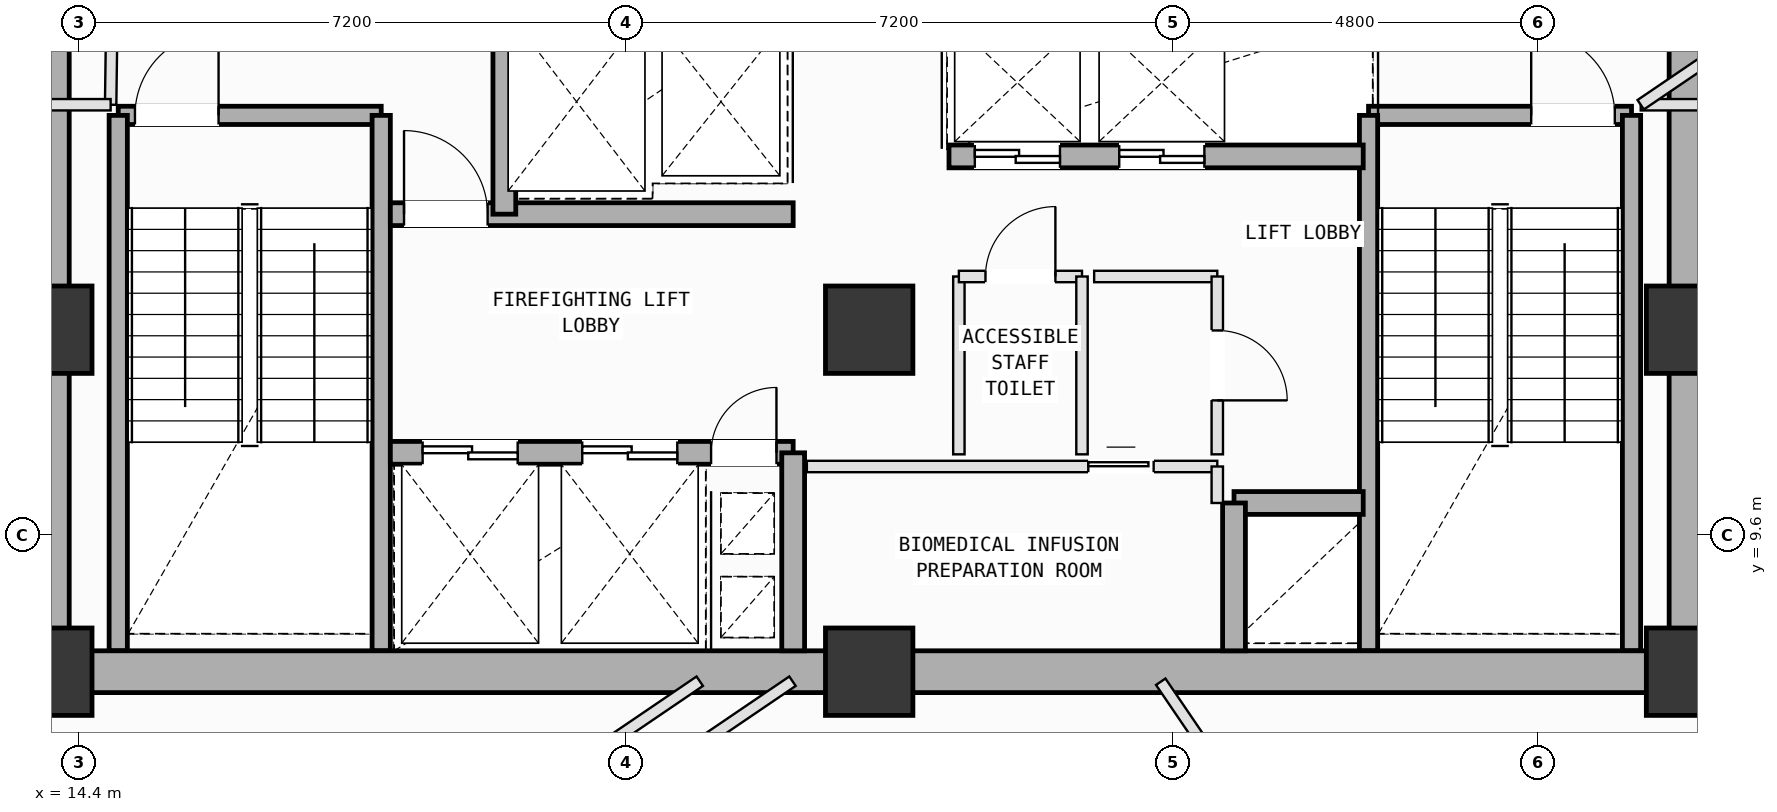
"""IFC4 building model, lengths in metres.
Left out: names, types, materials, properties, quantities, classifications, styles, units other than length and angle.
Written with IfcOpenShell. Run it as: python <this file> out.ifc"""

import sys

from ifc_helpers import new_model, si_unit, direction, frame, frame_2d, origin, origin_2d, place, context, subcontext, project, spatial, rectangle, extrude, element, fill, save


model = new_model("IFC4")
c1 = context("Model", 3, precision=1e-05, world=origin(), true_north=direction((0.0, 1.0)))
c2 = subcontext(c1, "Body", "Model", "MODEL_VIEW")
j1 = project(units=[si_unit("LENGTHUNIT", "METRE"), si_unit("PLANEANGLEUNIT", "RADIAN")], contexts=[c1])
p1 = place(None, origin())
s1 = spatial("IfcSite", under=j1, at=p1, CompositionType="ELEMENT")
p2 = place(p1, origin())
s2 = spatial("IfcBuilding", under=s1, at=p2, CompositionType="ELEMENT")
p3 = place(p2, frame((0.0, 0.0, 169.8)))
s3 = spatial("IfcBuildingStorey", under=s2, at=p3, CompositionType="ELEMENT", Elevation=169.8)
for number, where, z_axis, x_axis in (
    (1, (14.0, 7.8, 0.0), (0.0, 0.0, 1.0), (1.0, 0.0, 0.0)),
    (2, (14.0, 12.3, 0.0), (0.0, 0.0, 1.0), (1.0, 0.0, 0.0)),
    (3, (24.8, 7.8, 0.0), (0.0, 0.0, 1.0), (1.0, 0.0, 0.0)),
    (4, (24.8, 12.3, 0.0), (0.0, 0.0, 1.0), (1.0, 0.0, 0.0)),
    (5, (35.6, 7.8, 0.0), (0.0, 0.0, 1.0), (1.0, 0.0, 0.0)),
    (6, (35.6, 12.3, 0.0), (0.0, 0.0, 1.0), (1.0, 0.0, 0.0)),
):
    element("IfcColumn", number, at=place(p3, frame(where, z_axis=z_axis, x_axis=x_axis)), inside=s3, PredefinedType="COLUMN", context=c2, shape_type="SweptSolid", body=[
        extrude(rectangle(XDim=1.15, YDim=1.15, at=origin_2d()), origin(), (0.0, 0.0, 1.0), 4.0),
    ])
p4 = place(p3, frame((14.344, 4.298, 0.0), z_axis=(0.0, 0.0, 1.0), x_axis=(-0.562080452942, 0.827082562034, 0.0)))
e7 = element("IfcWall", 7, at=p4, inside=s3, PredefinedType="SOLIDWALL", context=c2, shape_type="SweptSolid", body=[
    extrude(rectangle(XDim=7.36, YDim=0.28, at=frame_2d((3.68, 0.0))), origin(), (0.0, 0.0, 1.0), 3.165),
])
p5 = place(p4, frame((2.981, 0.0, 0.75)))
e8 = element("IfcOpeningElement", 8, at=p5, cuts=e7, PredefinedType="OPENING", context=c2, shape_type="SweptSolid", body=[
    extrude(rectangle(XDim=1.4, YDim=1.85, at=frame_2d((0.7, 0.925))), frame((0.0, 0.15, 0.0), z_axis=(0.0, -1.0, 0.0), x_axis=(1.0, 0.0, 0.0)), (0.0, 0.0, 1.0), 0.3),
])
p6 = place(p4, frame((5.236, 0.0, 0.75)))
e9 = element("IfcOpeningElement", 9, at=p6, cuts=e7, PredefinedType="OPENING", context=c2, shape_type="SweptSolid", body=[
    extrude(rectangle(XDim=1.4, YDim=1.85, at=frame_2d((0.7, 0.925))), frame((0.0, 0.15, 0.0), z_axis=(0.0, -1.0, 0.0), x_axis=(1.0, 0.0, 0.0)), (0.0, 0.0, 1.0), 0.3),
])
p7 = place(p3, frame((14.92, 15.12, 0.0), z_axis=(0.0, 0.0, 1.0), x_axis=(1.0, 0.0, 0.0)))
e10 = element("IfcWall", 10, at=p7, inside=s3, PredefinedType="SOLIDWALL", context=c2, shape_type="SweptSolid", body=[
    extrude(rectangle(XDim=3.46, YDim=0.24, at=frame_2d((1.73, 0.0))), origin(), (0.0, 0.0, 1.0), 3.78),
])
p8 = place(p7, frame((0.22, 0.0, 0.0)))
e11 = element("IfcOpeningElement", 11, at=p8, cuts=e10, PredefinedType="OPENING", context=c2, shape_type="SweptSolid", body=[
    extrude(rectangle(XDim=1.1, YDim=2.15, at=frame_2d((0.55, 1.075))), frame((0.0, 0.13, 0.0), z_axis=(0.0, -1.0, 0.0), x_axis=(1.0, 0.0, 0.0)), (0.0, 0.0, 1.0), 0.26),
])
for number, where, z_axis, x_axis in (
    (12, (18.38, 15.12, 0.0), (0.0, 0.0, 1.0), (0.0, -1.0, 0.0)),
    (13, (14.92, 8.075, 0.0), (0.0, 0.0, 1.0), (0.0, 1.0, 0.0)),
):
    element("IfcWall", number, at=place(p3, frame(where, z_axis=z_axis, x_axis=x_axis)), inside=s3, PredefinedType="SOLIDWALL", context=c2, shape_type="SweptSolid", body=[
        extrude(rectangle(XDim=7.045, YDim=0.24, at=frame_2d((3.522, 0.0))), origin(), (0.0, 0.0, 1.0), 3.78),
    ])
p9 = place(p3, frame((31.37, 15.12, 0.0), z_axis=(0.0, 0.0, 1.0), x_axis=(1.0, 0.0, 0.0)))
e14 = element("IfcWall", 14, at=p9, inside=s3, PredefinedType="SOLIDWALL", context=c2, shape_type="SweptSolid", body=[
    extrude(rectangle(XDim=3.46, YDim=0.24, at=frame_2d((1.73, 0.0))), origin(), (0.0, 0.0, 1.0), 3.78),
])
p10 = place(p9, frame((2.14, 0.0, 0.0)))
e15 = element("IfcOpeningElement", 15, at=p10, cuts=e14, PredefinedType="OPENING", context=c2, shape_type="SweptSolid", body=[
    extrude(rectangle(XDim=1.1, YDim=2.15, at=frame_2d((0.55, 1.075))), frame((0.0, 0.13, 0.0), z_axis=(0.0, -1.0, 0.0), x_axis=(1.0, 0.0, 0.0)), (0.0, 0.0, 1.0), 0.26),
])
for number, where, z_axis, x_axis in (
    (16, (34.83, 15.12, 0.0), (0.0, 0.0, 1.0), (0.0, -1.0, 0.0)),
    (17, (31.37, 8.075, 0.0), (0.0, 0.0, 1.0), (0.0, 1.0, 0.0)),
):
    element("IfcWall", number, at=place(p3, frame(where, z_axis=z_axis, x_axis=x_axis)), inside=s3, PredefinedType="SOLIDWALL", context=c2, shape_type="SweptSolid", body=[
        extrude(rectangle(XDim=7.045, YDim=0.24, at=frame_2d((3.522, 0.0))), origin(), (0.0, 0.0, 1.0), 3.78),
    ])
for number, where, z_axis, x_axis in (
    (18, (14.0, 7.8, 0.0), (0.0, 0.0, 1.0), (1.0, 0.0, 0.0)),
    (19, (24.8, 7.8, 0.0), (0.0, 0.0, 1.0), (1.0, 0.0, 0.0)),
):
    element("IfcWall", number, at=place(p3, frame(where, z_axis=z_axis, x_axis=x_axis)), inside=s3, PredefinedType="SHEAR", context=c2, shape_type="SweptSolid", body=[
        extrude(rectangle(XDim=10.8, YDim=0.55, at=frame_2d((5.4, 0.0))), origin(), (0.0, 0.0, 1.0), 3.78),
    ])
for number, where, z_axis, x_axis in (
    (20, (35.6, 7.8, 0.0), (0.0, 0.0, 1.0), (0.0, 1.0, 0.0)),
    (21, (14.0, 16.8, 0.0), (0.0, 0.0, 1.0), (0.0, -1.0, 0.0)),
):
    element("IfcWall", number, at=place(p3, frame(where, z_axis=z_axis, x_axis=x_axis)), inside=s3, PredefinedType="SHEAR", context=c2, shape_type="SweptSolid", body=[
        extrude(rectangle(XDim=9.0, YDim=0.55, at=frame_2d((4.5, 0.0))), origin(), (0.0, 0.0, 1.0), 3.78),
    ])
p11 = place(p3, frame((18.5, 10.68, 0.0), z_axis=(0.0, 0.0, 1.0), x_axis=(1.0, 0.0, 0.0)))
e22 = element("IfcWall", 22, at=p11, inside=s3, PredefinedType="SOLIDWALL", context=c2, shape_type="SweptSolid", body=[
    extrude(rectangle(XDim=5.3, YDim=0.3, at=frame_2d((2.65, 0.0))), origin(), (0.0, 0.0, 1.0), 3.78),
])
p12 = place(p11, frame((4.22, 0.0, 0.0)))
e23 = element("IfcOpeningElement", 23, at=p12, cuts=e22, PredefinedType="OPENING", context=c2, shape_type="SweptSolid", body=[
    extrude(rectangle(XDim=0.86, YDim=2.06, at=frame_2d((0.43, 1.03))), frame((0.0, 0.16, 0.0), z_axis=(0.0, -1.0, 0.0), x_axis=(1.0, 0.0, 0.0)), (0.0, 0.0, 1.0), 0.32),
])
p13 = place(p11, frame((0.425, 0.0, 0.0)))
e24 = element("IfcOpeningElement", 24, at=p13, cuts=e22, PredefinedType="OPENING", context=c2, shape_type="SweptSolid", body=[
    extrude(rectangle(XDim=1.25, YDim=2.18, at=frame_2d((0.625, 1.09))), frame((0.0, 0.16, 0.0), z_axis=(0.0, -1.0, 0.0), x_axis=(1.0, 0.0, 0.0)), (0.0, 0.0, 1.0), 0.32),
])
p14 = place(p11, frame((2.525, 0.0, 0.0)))
e25 = element("IfcOpeningElement", 25, at=p14, cuts=e22, PredefinedType="OPENING", context=c2, shape_type="SweptSolid", body=[
    extrude(rectangle(XDim=1.25, YDim=2.18, at=frame_2d((0.625, 1.09))), frame((0.0, 0.16, 0.0), z_axis=(0.0, -1.0, 0.0), x_axis=(1.0, 0.0, 0.0)), (0.0, 0.0, 1.0), 0.32),
])
p15 = place(p3, frame((18.5, 13.82, 0.0), z_axis=(0.0, 0.0, 1.0), x_axis=(1.0, 0.0, 0.0)))
e26 = element("IfcWall", 26, at=p15, inside=s3, PredefinedType="SOLIDWALL", context=c2, shape_type="SweptSolid", body=[
    extrude(rectangle(XDim=5.3, YDim=0.3, at=frame_2d((2.65, 0.0))), origin(), (0.0, 0.0, 1.0), 3.78),
])
p16 = place(p15, frame((0.18, 0.0, 0.0)))
e27 = element("IfcOpeningElement", 27, at=p16, cuts=e26, PredefinedType="OPENING", context=c2, shape_type="SweptSolid", body=[
    extrude(rectangle(XDim=1.1, YDim=2.15, at=frame_2d((0.55, 1.075))), frame((0.0, 0.16, 0.0), z_axis=(0.0, -1.0, 0.0), x_axis=(1.0, 0.0, 0.0)), (0.0, 0.0, 1.0), 0.32),
])
p17 = place(p3, frame((23.8, 8.075, 0.0), z_axis=(0.0, 0.0, 1.0), x_axis=(0.0, 1.0, 0.0)))
e28 = element("IfcWall", 28, at=p17, inside=s3, PredefinedType="SOLIDWALL", context=c2, shape_type="SweptSolid", body=[
    extrude(rectangle(XDim=2.605, YDim=0.3, at=frame_2d((1.302, 0.0))), origin(), (0.0, 0.0, 1.0), 3.78),
])
p18 = place(p3, frame((20.0, 13.82, 0.0), z_axis=(0.0, 0.0, 1.0), x_axis=(0.0, 1.0, 0.0)))
e29 = element("IfcWall", 29, at=p18, inside=s3, PredefinedType="SOLIDWALL", context=c2, shape_type="SweptSolid", body=[
    extrude(rectangle(XDim=2.73, YDim=0.3, at=frame_2d((1.365, 0.0))), origin(), (0.0, 0.0, 1.0), 3.78),
])
p19 = place(p3, frame((29.6, 10.02, 0.0), z_axis=(0.0, 0.0, 1.0), x_axis=(1.0, 0.0, 0.0)))
e30 = element("IfcWall", 30, at=p19, inside=s3, PredefinedType="SOLIDWALL", context=c2, shape_type="SweptSolid", body=[
    extrude(rectangle(XDim=1.7, YDim=0.3, at=frame_2d((0.85, 0.0))), origin(), (0.0, 0.0, 1.0), 3.78),
])
p20 = place(p3, frame((29.6, 8.075, 0.0), z_axis=(0.0, 0.0, 1.0), x_axis=(0.0, 1.0, 0.0)))
e31 = element("IfcWall", 31, at=p20, inside=s3, PredefinedType="SOLIDWALL", context=c2, shape_type="SweptSolid", body=[
    extrude(rectangle(XDim=1.945, YDim=0.3, at=frame_2d((0.973, 0.0))), origin(), (0.0, 0.0, 1.0), 3.78),
])
p21 = place(p3, frame((25.85, 14.58, 0.0), z_axis=(0.0, 0.0, 1.0), x_axis=(1.0, 0.0, 0.0)))
e32 = element("IfcWall", 32, at=p21, inside=s3, PredefinedType="SOLIDWALL", context=c2, shape_type="SweptSolid", body=[
    extrude(rectangle(XDim=5.45, YDim=0.3, at=frame_2d((2.725, 0.0))), origin(), (0.0, 0.0, 1.0), 3.78),
])
p22 = place(p21, frame((0.34, 0.0, 0.0)))
e33 = element("IfcOpeningElement", 33, at=p22, cuts=e32, PredefinedType="OPENING", context=c2, shape_type="SweptSolid", body=[
    extrude(rectangle(XDim=1.12, YDim=2.15, at=frame_2d((0.56, 1.075))), frame((0.0, 0.16, 0.0), z_axis=(0.0, -1.0, 0.0), x_axis=(1.0, 0.0, 0.0)), (0.0, 0.0, 1.0), 0.32),
])
p23 = place(p21, frame((2.24, 0.0, 0.0)))
e34 = element("IfcOpeningElement", 34, at=p23, cuts=e32, PredefinedType="OPENING", context=c2, shape_type="SweptSolid", body=[
    extrude(rectangle(XDim=1.12, YDim=2.15, at=frame_2d((0.56, 1.075))), frame((0.0, 0.16, 0.0), z_axis=(0.0, -1.0, 0.0), x_axis=(1.0, 0.0, 0.0)), (0.0, 0.0, 1.0), 0.32),
])
p24 = place(p3, frame((23.98, 10.5, 0.0), z_axis=(0.0, 0.0, 1.0), x_axis=(1.0, 0.0, 0.0)))
e35 = element("IfcWall", 35, at=p24, inside=s3, PredefinedType="PARTITIONING", context=c2, shape_type="SweptSolid", body=[
    extrude(rectangle(XDim=5.4, YDim=0.15, at=frame_2d((2.7, 0.0))), origin(), (0.0, 0.0, 1.0), 3.78),
])
p25 = place(p24, frame((3.703, 0.0, 0.0)))
e36 = element("IfcOpeningElement", 36, at=p25, cuts=e35, PredefinedType="OPENING", context=c2, shape_type="SweptSolid", body=[
    extrude(rectangle(XDim=0.86, YDim=2.06, at=frame_2d((0.43, 1.03))), frame((0.0, 0.085, 0.0), z_axis=(0.0, -1.0, 0.0), x_axis=(1.0, 0.0, 0.0)), (0.0, 0.0, 1.0), 0.17),
])
p26 = place(p3, frame((29.38, 10.5, 0.0), z_axis=(0.0, 0.0, 1.0), x_axis=(0.0, -1.0, 0.0)))
e37 = element("IfcWall", 37, at=p26, inside=s3, PredefinedType="PARTITIONING", context=c2, shape_type="SweptSolid", body=[
    extrude(rectangle(XDim=0.48, YDim=0.15, at=frame_2d((0.24, 0.0))), origin(), (0.0, 0.0, 1.0), 3.78),
])
p27 = place(p3, frame((25.98, 10.66, 0.0), z_axis=(0.0, 0.0, 1.0), x_axis=(0.0, 1.0, 0.0)))
e38 = element("IfcWall", 38, at=p27, inside=s3, PredefinedType="PARTITIONING", context=c2, shape_type="SweptSolid", body=[
    extrude(rectangle(XDim=2.34, YDim=0.15, at=frame_2d((1.17, 0.0))), origin(), (0.0, 0.0, 1.0), 3.78),
])
p28 = place(p3, frame((25.98, 13.0, 0.0), z_axis=(0.0, 0.0, 1.0), x_axis=(1.0, 0.0, 0.0)))
e39 = element("IfcWall", 39, at=p28, inside=s3, PredefinedType="PARTITIONING", context=c2, shape_type="SweptSolid", body=[
    extrude(rectangle(XDim=1.62, YDim=0.15, at=frame_2d((0.81, 0.0))), origin(), (0.0, 0.0, 1.0), 3.78),
])
p29 = place(p28, frame((0.35, 0.0, 0.0)))
e40 = element("IfcOpeningElement", 40, at=p29, cuts=e39, PredefinedType="OPENING", context=c2, shape_type="SweptSolid", body=[
    extrude(rectangle(XDim=0.92, YDim=2.1, at=frame_2d((0.46, 1.05))), frame((0.0, 0.085, 0.0), z_axis=(0.0, -1.0, 0.0), x_axis=(1.0, 0.0, 0.0)), (0.0, 0.0, 1.0), 0.17),
])
p30 = place(p3, frame((27.6, 13.0, 0.0), z_axis=(0.0, 0.0, 1.0), x_axis=(0.0, -1.0, 0.0)))
e41 = element("IfcWall", 41, at=p30, inside=s3, PredefinedType="PARTITIONING", context=c2, shape_type="SweptSolid", body=[
    extrude(rectangle(XDim=2.34, YDim=0.15, at=frame_2d((1.17, 0.0))), origin(), (0.0, 0.0, 1.0), 3.78),
])
p31 = place(p3, frame((27.76, 13.0, 0.0), z_axis=(0.0, 0.0, 1.0), x_axis=(1.0, 0.0, 0.0)))
e42 = element("IfcWall", 42, at=p31, inside=s3, PredefinedType="PARTITIONING", context=c2, shape_type="SweptSolid", body=[
    extrude(rectangle(XDim=1.62, YDim=0.15, at=frame_2d((0.81, 0.0))), origin(), (0.0, 0.0, 1.0), 3.78),
])
p32 = place(p3, frame((29.38, 13.0, 0.0), z_axis=(0.0, 0.0, 1.0), x_axis=(0.0, -1.0, 0.0)))
e43 = element("IfcWall", 43, at=p32, inside=s3, PredefinedType="PARTITIONING", context=c2, shape_type="SweptSolid", body=[
    extrude(rectangle(XDim=2.34, YDim=0.15, at=frame_2d((1.17, 0.0))), origin(), (0.0, 0.0, 1.0), 3.78),
])
p33 = place(p32, frame((0.71, 0.0, 0.0)))
e44 = element("IfcOpeningElement", 44, at=p33, cuts=e43, PredefinedType="OPENING", context=c2, shape_type="SweptSolid", body=[
    extrude(rectangle(XDim=0.92, YDim=2.1, at=frame_2d((0.46, 1.05))), frame((0.0, 0.085, 0.0), z_axis=(0.0, -1.0, 0.0), x_axis=(1.0, 0.0, 0.0)), (0.0, 0.0, 1.0), 0.17),
])
p34 = place(p3, frame((16.317, 2.596, 0.0), z_axis=(0.0, 0.0, 1.0), x_axis=(0.82709631039, 0.562060222165, 0.0)))
e45 = element("IfcWall", 45, at=p34, inside=s3, PredefinedType="PARTITIONING", context=c2, shape_type="SweptSolid", body=[
    extrude(rectangle(XDim=9.037, YDim=0.15, at=frame_2d((4.518, 0.0))), origin(), (0.0, 0.0, 1.0), 3.78),
])
p35 = place(p3, frame((28.636, 7.668, 0.0), z_axis=(0.0, 0.0, 1.0), x_axis=(0.562095190214, -0.827072546479, 0.0)))
e46 = element("IfcWall", 46, at=p35, inside=s3, PredefinedType="PARTITIONING", context=c2, shape_type="SweptSolid", body=[
    extrude(rectangle(XDim=10.756, YDim=0.15, at=frame_2d((5.378, 0.0))), origin(), (0.0, 0.0, 1.0), 3.78),
])
p36 = place(p35, frame((5.129, 0.0, 0.0)))
e47 = element("IfcOpeningElement", 47, at=p36, cuts=e46, PredefinedType="OPENING", context=c2, shape_type="SweptSolid", body=[
    extrude(rectangle(XDim=0.86, YDim=2.06, at=frame_2d((0.43, 1.03))), frame((0.0, 0.085, 0.0), z_axis=(0.0, -1.0, 0.0), x_axis=(1.0, 0.0, 0.0)), (0.0, 0.0, 1.0), 0.17),
])
p37 = place(p3, frame((36.15, 15.26, 0.0), z_axis=(0.0, 0.0, 1.0), x_axis=(-1.0, 0.0, 0.0)))
e48 = element("IfcWall", 48, at=p37, inside=s3, PredefinedType="PARTITIONING", context=c2, shape_type="SweptSolid", body=[
    extrude(rectangle(XDim=1.199, YDim=0.15, at=frame_2d((0.6, 0.0))), origin(), (0.0, 0.0, 1.0), 3.78),
])
p38 = place(p3, frame((34.951, 15.26, 0.0), z_axis=(0.0, 0.0, 1.0), x_axis=(0.827290216258, 0.561774775229, 0.0)))
e49 = element("IfcWall", 49, at=p38, inside=s3, PredefinedType="PARTITIONING", context=c2, shape_type="SweptSolid", body=[
    extrude(rectangle(XDim=1.31, YDim=0.15, at=frame_2d((0.655, 0.0))), origin(), (0.0, 0.0, 1.0), 3.78),
])
p39 = place(p3, frame((35.6, 7.5, 0.0), z_axis=(0.0, 0.0, 1.0), x_axis=(1.0, 0.0, 0.0)))
e50 = element("IfcWall", 50, at=p39, inside=s3, PredefinedType="PARTITIONING", context=c2, shape_type="SweptSolid", body=[
    extrude(rectangle(XDim=0.55, YDim=0.15, at=frame_2d((0.275, 0.0))), origin(), (0.0, 0.0, 1.0), 3.065),
])
p40 = place(p3, frame((14.841, 16.8, 0.0), z_axis=(0.0, 0.0, 1.0), x_axis=(-0.01363221443, -0.999907077048, 0.0)))
e51 = element("IfcWall", 51, at=p40, inside=s3, PredefinedType="PARTITIONING", context=c2, shape_type="SweptSolid", body=[
    extrude(rectangle(XDim=1.54, YDim=0.15, at=frame_2d((0.77, 0.0))), origin(), (0.0, 0.0, 1.0), 3.78),
])
p41 = place(p3, frame((14.82, 15.26, 0.0), z_axis=(0.0, 0.0, 1.0), x_axis=(-1.0, 0.0, 0.0)))
e52 = element("IfcWall", 52, at=p41, inside=s3, PredefinedType="PARTITIONING", context=c2, shape_type="SweptSolid", body=[
    extrude(rectangle(XDim=1.12, YDim=0.15, at=frame_2d((0.56, 0.0))), origin(), (0.0, 0.0, 1.0), 3.78),
])
p42 = place(p3, frame((22.571, 7.675, 0.0), z_axis=(0.0, 0.0, 1.0), x_axis=(-0.827048106259, -0.562131150119, 0.0)))
e53 = element("IfcWall", 53, at=p42, inside=s3, PredefinedType="PARTITIONING", context=c2, shape_type="SweptSolid", body=[
    extrude(rectangle(XDim=8.587, YDim=0.15, at=frame_2d((4.293, 0.0))), origin(), (0.0, 0.0, 1.0), 3.78),
])
p43 = place(p3, frame((7.577, 14.46, 0.0), z_axis=(0.0, 0.0, 1.0), x_axis=(0.827101219413, 0.562052998253, 0.0)))
e54 = element("IfcWall", 54, at=p43, inside=s3, PredefinedType="PARTITIONING", context=c2, shape_type="SweptSolid", body=[
    extrude(rectangle(XDim=8.938, YDim=0.15, at=frame_2d((4.469, 0.0))), origin(), (0.0, 0.0, 1.0), 3.78),
])
p44 = place(p43, frame((4.039, 0.0, 0.0)))
e55 = element("IfcOpeningElement", 55, at=p44, cuts=e54, PredefinedType="OPENING", context=c2, shape_type="SweptSolid", body=[
    extrude(rectangle(XDim=0.86, YDim=2.06, at=frame_2d((0.43, 1.03))), frame((0.0, 0.085, 0.0), z_axis=(0.0, -1.0, 0.0), x_axis=(1.0, 0.0, 0.0)), (0.0, 0.0, 1.0), 0.17),
])
p45 = place(p8, origin())
e56 = element("IfcDoor", 56, at=p45, inside=s3, OperationType="SINGLE_SWING_RIGHT", PredefinedType="DOOR", context=c2, shape_type="SweptSolid", body=[
    extrude(rectangle(XDim=1.1, YDim=2.15, at=frame_2d((0.55, 1.075))), frame((0.0, 0.025, 0.0), z_axis=(0.0, -1.0, 0.0), x_axis=(1.0, 0.0, 0.0)), (0.0, 0.0, 1.0), 0.05),
])
fill(e11, e56)
p46 = place(p10, origin())
e57 = element("IfcDoor", 57, at=p46, inside=s3, OperationType="SINGLE_SWING_LEFT", PredefinedType="DOOR", context=c2, shape_type="SweptSolid", body=[
    extrude(rectangle(XDim=1.1, YDim=2.15, at=frame_2d((0.55, 1.075))), frame((0.0, 0.025, 0.0), z_axis=(0.0, -1.0, 0.0), x_axis=(1.0, 0.0, 0.0)), (0.0, 0.0, 1.0), 0.05),
])
fill(e15, e57)
p47 = place(p12, origin())
e58 = element("IfcDoor", 58, at=p47, inside=s3, OperationType="SINGLE_SWING_RIGHT", PredefinedType="DOOR", context=c2, shape_type="SweptSolid", body=[
    extrude(rectangle(XDim=0.86, YDim=2.06, at=frame_2d((0.43, 1.03))), frame((0.0, 0.025, 0.0), z_axis=(0.0, -1.0, 0.0), x_axis=(1.0, 0.0, 0.0)), (0.0, 0.0, 1.0), 0.05),
])
fill(e23, e58)
p48 = place(p16, origin())
e59 = element("IfcDoor", 59, at=p48, inside=s3, OperationType="SINGLE_SWING_LEFT", PredefinedType="DOOR", context=c2, shape_type="SweptSolid", body=[
    extrude(rectangle(XDim=1.1, YDim=2.15, at=frame_2d((0.55, 1.075))), frame((0.0, 0.025, 0.0), z_axis=(0.0, -1.0, 0.0), x_axis=(1.0, 0.0, 0.0)), (0.0, 0.0, 1.0), 0.05),
])
fill(e27, e59)
p49 = place(p13, origin())
e60 = element("IfcDoor", 60, at=p49, inside=s3, OperationType="DOUBLE_DOOR_SLIDING", PredefinedType="DOOR", context=c2, shape_type="SweptSolid", body=[
    extrude(rectangle(XDim=1.25, YDim=2.18, at=frame_2d((0.625, 1.09))), frame((0.0, 0.025, 0.0), z_axis=(0.0, -1.0, 0.0), x_axis=(1.0, 0.0, 0.0)), (0.0, 0.0, 1.0), 0.05),
])
fill(e24, e60)
p50 = place(p14, origin())
e61 = element("IfcDoor", 61, at=p50, inside=s3, OperationType="DOUBLE_DOOR_SLIDING", PredefinedType="DOOR", context=c2, shape_type="SweptSolid", body=[
    extrude(rectangle(XDim=1.25, YDim=2.18, at=frame_2d((0.625, 1.09))), frame((0.0, 0.025, 0.0), z_axis=(0.0, -1.0, 0.0), x_axis=(1.0, 0.0, 0.0)), (0.0, 0.0, 1.0), 0.05),
])
fill(e25, e61)
p51 = place(p22, origin())
e62 = element("IfcDoor", 62, at=p51, inside=s3, OperationType="DOUBLE_DOOR_SLIDING", PredefinedType="DOOR", context=c2, shape_type="SweptSolid", body=[
    extrude(rectangle(XDim=1.12, YDim=2.15, at=frame_2d((0.56, 1.075))), frame((0.0, 0.025, 0.0), z_axis=(0.0, -1.0, 0.0), x_axis=(1.0, 0.0, 0.0)), (0.0, 0.0, 1.0), 0.05),
])
fill(e33, e62)
p52 = place(p23, origin())
e63 = element("IfcDoor", 63, at=p52, inside=s3, OperationType="DOUBLE_DOOR_SLIDING", PredefinedType="DOOR", context=c2, shape_type="SweptSolid", body=[
    extrude(rectangle(XDim=1.12, YDim=2.15, at=frame_2d((0.56, 1.075))), frame((0.0, 0.025, 0.0), z_axis=(0.0, -1.0, 0.0), x_axis=(1.0, 0.0, 0.0)), (0.0, 0.0, 1.0), 0.05),
])
fill(e34, e63)
p53 = place(p29, origin())
e64 = element("IfcDoor", 64, at=p53, inside=s3, OperationType="SINGLE_SWING_RIGHT", PredefinedType="DOOR", context=c2, shape_type="SweptSolid", body=[
    extrude(rectangle(XDim=0.92, YDim=2.1, at=frame_2d((0.46, 1.05))), frame((0.0, 0.025, 0.0), z_axis=(0.0, -1.0, 0.0), x_axis=(1.0, 0.0, 0.0)), (0.0, 0.0, 1.0), 0.05),
])
fill(e40, e64)
p54 = place(p33, origin())
e65 = element("IfcDoor", 65, at=p54, inside=s3, OperationType="SINGLE_SWING_RIGHT", PredefinedType="DOOR", context=c2, shape_type="SweptSolid", body=[
    extrude(rectangle(XDim=0.92, YDim=2.1, at=frame_2d((0.46, 1.05))), frame((0.0, 0.025, 0.0), z_axis=(0.0, -1.0, 0.0), x_axis=(1.0, 0.0, 0.0)), (0.0, 0.0, 1.0), 0.05),
])
fill(e44, e65)
p55 = place(p25, origin())
e66 = element("IfcDoor", 66, at=p55, inside=s3, OperationType="SLIDING_TO_LEFT", PredefinedType="DOOR", context=c2, shape_type="SweptSolid", body=[
    extrude(rectangle(XDim=0.86, YDim=2.06, at=frame_2d((0.43, 1.03))), frame((0.0, 0.025, 0.0), z_axis=(0.0, -1.0, 0.0), x_axis=(1.0, 0.0, 0.0)), (0.0, 0.0, 1.0), 0.05),
])
fill(e36, e66)
save(model, sys.argv[1])
